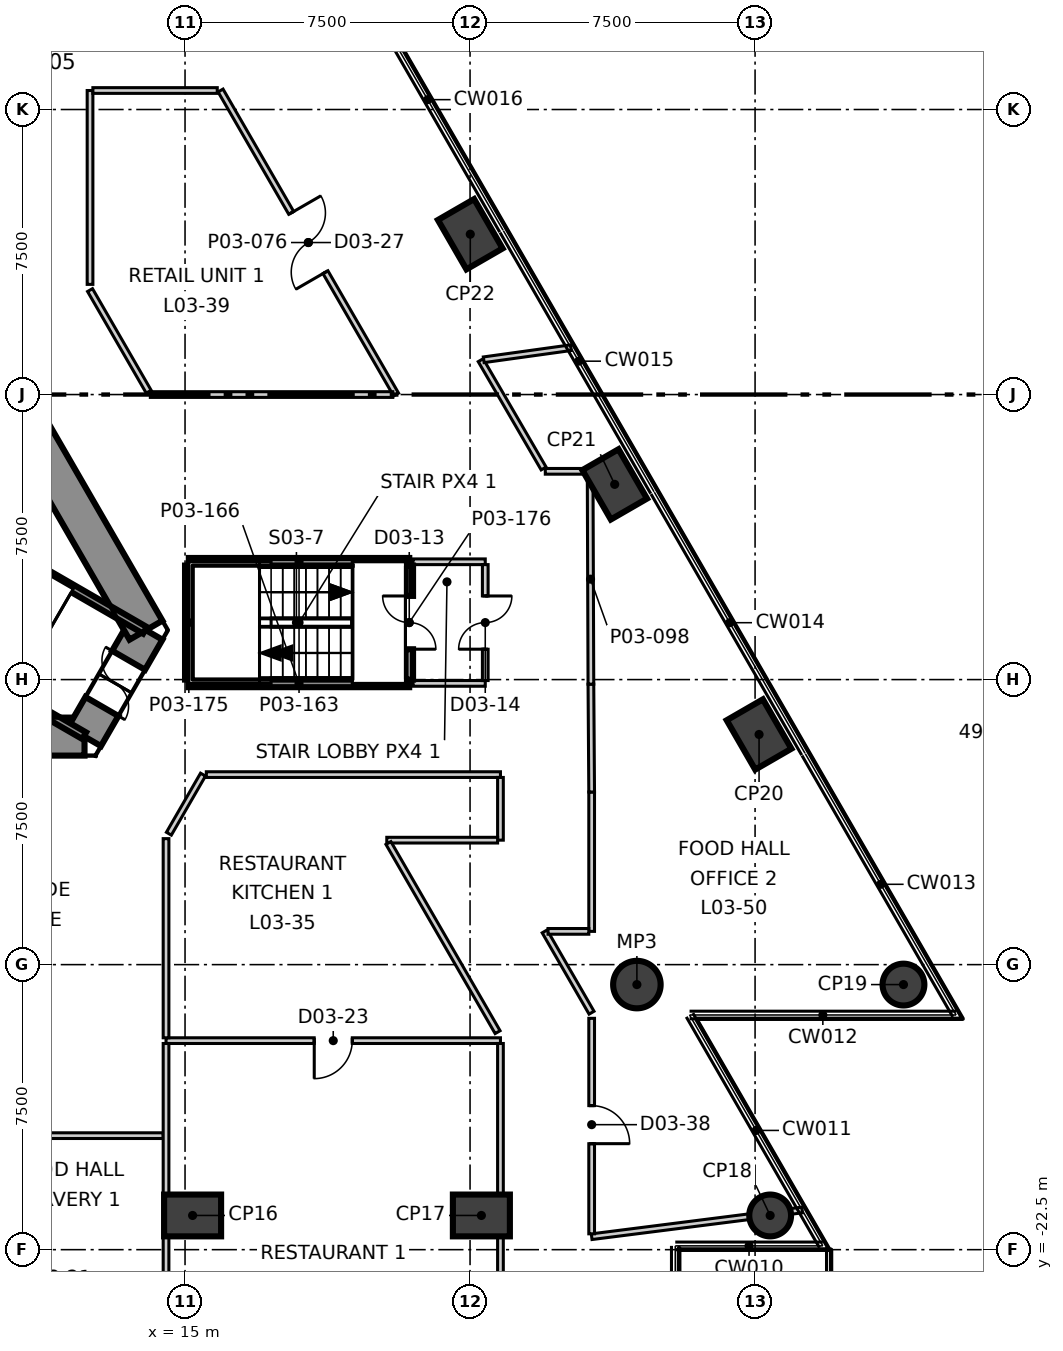
"""IFC4 building model, lengths in metres.
Left out: names, types, materials, properties, quantities, classifications, styles, units other than length and angle.
Written with IfcOpenShell. Run it as: python <this file> out.ifc"""

import sys

from ifc_helpers import new_model, si_unit, direction, frame, frame_2d, origin, origin_2d, place, context, subcontext, project, spatial, polyline, rectangle, circle, outline, extrude, element, fill, save


model = new_model("IFC4")
c1 = context("Model", 3, precision=1e-05, world=origin(), true_north=direction((0.0, 1.0)))
c2 = subcontext(c1, "Body", "Model", "MODEL_VIEW")
j1 = project(units=[si_unit("LENGTHUNIT", "METRE"), si_unit("PLANEANGLEUNIT", "RADIAN")], contexts=[c1])
p1 = place(None, origin())
s1 = spatial("IfcSite", under=j1, at=p1, CompositionType="ELEMENT")
p2 = place(p1, origin())
s2 = spatial("IfcBuilding", under=s1, at=p2, CompositionType="ELEMENT")
p3 = place(p2, frame((0.0, 0.0, 19.9)))
s3 = spatial("IfcBuildingStorey", under=s2, at=p3, CompositionType="ELEMENT", Elevation=19.9)
p4 = place(p3, frame((-12.355, -9.0, -0.4), z_axis=(0.0, 0.0, 1.0), x_axis=(1.0, 0.0, 0.0)))
e1 = element("IfcWall", 1, at=p4, inside=s3, PredefinedType="SHEAR", context=c2, shape_type="SweptSolid", body=[
    extrude(outline(polyline([(-0.289, -0.5), (1.656, -0.5), (3.601, -0.5), (5.547, -0.5), (7.492, -0.5), (9.437, -0.5), (11.382, -0.5), (13.328, -0.5), (15.273, -0.5), (17.218, -0.5), (19.163, -0.5), (21.109, -0.5), (23.054, -0.5), (24.999, -0.5), (24.422, 0.5), (22.566, 0.5), (20.709, 0.5), (18.853, 0.5), (16.996, 0.5), (15.14, 0.5), (13.283, 0.5), (11.427, 0.5), (9.57, 0.5), (7.714, 0.5), (5.857, 0.5), (4.001, 0.5), (2.145, 0.5), (0.288, 0.5), (-0.289, -0.5)])), origin(), (0.0, 0.0, 1.0), 5.4),
])
p5 = place(p3, frame((12.355, -9.0, -0.4), z_axis=(0.0, 0.0, 1.0), x_axis=(0.500077567175, 0.865980615723, 0.0)))
e2 = element("IfcWall", 2, at=p5, inside=s3, PredefinedType="SHEAR", context=c2, shape_type="SweptSolid", body=[
    extrude(outline(polyline([(-0.288, -0.5), (1.617, -0.5), (3.522, -0.5), (2.945, 0.5), (1.617, 0.5), (0.289, 0.499), (-0.288, -0.5)])), origin(), (0.0, 0.0, 1.0), 5.4),
])
p6 = place(p5, frame((0.917, 0.0, 0.4)))
e3 = element("IfcOpeningElement", 3, at=p6, cuts=e2, PredefinedType="OPENING", context=c2, shape_type="SweptSolid", body=[
    extrude(rectangle(XDim=1.4, YDim=2.1, at=frame_2d((0.7, 1.05))), frame((0.0, 0.51, 0.0), z_axis=(0.0, -1.0, 0.0), x_axis=(1.0, 0.0, 0.0)), (0.0, 0.0, 1.0), 1.02),
])
p7 = place(p3, frame((13.972, -6.2, -0.4), z_axis=(0.0, 0.0, 1.0), x_axis=(-0.499992141631, 0.866029940768, 0.0)))
e4 = element("IfcWall", 4, at=p7, inside=s3, PredefinedType="SHEAR", context=c2, shape_type="SweptSolid", body=[
    extrude(outline(polyline([(-0.288, -0.5), (1.657, -0.5), (3.602, -0.5), (5.547, -0.5), (7.493, -0.5), (9.438, -0.5), (11.383, -0.5), (13.328, -0.5), (15.273, -0.5), (17.218, -0.499), (19.164, -0.499), (21.109, -0.499), (23.054, -0.499), (24.999, -0.499), (24.422, 0.5), (22.566, 0.5), (20.709, 0.5), (18.853, 0.5), (16.996, 0.5), (15.14, 0.5), (13.283, 0.5), (11.427, 0.5), (9.57, 0.5), (7.714, 0.5), (5.857, 0.5), (4.001, 0.5), (2.145, 0.5), (0.288, 0.5), (-0.288, -0.5)])), origin(), (0.0, 0.0, 1.0), 5.4),
])
p8 = place(p7, frame((11.455, 0.0, 0.4)))
e5 = element("IfcOpeningElement", 5, at=p8, cuts=e4, PredefinedType="OPENING", context=c2, shape_type="SweptSolid", body=[
    extrude(rectangle(XDim=1.8, YDim=2.1, at=frame_2d((0.9, 1.05))), frame((0.0, 0.51, 0.0), z_axis=(0.0, -1.0, 0.0), x_axis=(1.0, 0.0, 0.0)), (0.0, 0.0, 1.0), 1.02),
])
for number, where, z_axis, x_axis in (
    (6, (15.199, -21.6, -0.4), (0.0, 0.0, 1.0), (1.0, 0.0, 0.0)),
    (7, (22.798, -21.6, -0.4), (0.0, 0.0, 1.0), (1.0, 0.0, 0.0)),
):
    element("IfcColumn", number, at=place(p3, frame(where, z_axis=z_axis, x_axis=x_axis)), inside=s3, PredefinedType="COLUMN", context=c2, shape_type="SweptSolid", body=[
        extrude(rectangle(XDim=1.5, YDim=1.1, at=origin_2d()), origin(), (0.0, 0.0, 1.0), 5.4),
    ])
for number, where, z_axis, x_axis in (
    (8, (30.397, -21.6, -0.4), (0.0, 0.0, 1.0), (1.0, 0.0, 0.0)),
    (9, (33.905, -15.525, -0.4), (0.0, 0.0, 1.0), (-0.5, 0.866, 0.0)),
):
    element("IfcColumn", number, at=place(p3, frame(where, z_axis=z_axis, x_axis=x_axis)), inside=s3, PredefinedType="COLUMN", context=c2, shape_type="SweptSolid", body=[
        extrude(circle(Radius=0.55, at=origin_2d()), origin(), (0.0, 0.0, 1.0), 5.4),
    ])
for number, where, z_axis, x_axis in (
    (10, (30.105, -8.944, -0.4), (0.0, 0.0, 1.0), (-0.5, 0.866, 0.0)),
    (11, (26.306, -2.363, -0.4), (0.0, 0.0, 1.0), (-0.5, 0.866, 0.0)),
    (12, (22.506, 4.219, -0.4), (0.0, 0.0, 1.0), (-0.5, 0.866, 0.0)),
):
    element("IfcColumn", number, at=place(p3, frame(where, z_axis=z_axis, x_axis=x_axis)), inside=s3, PredefinedType="COLUMN", context=c2, shape_type="SweptSolid", body=[
        extrude(rectangle(XDim=1.5, YDim=1.1, at=origin_2d()), origin(), (0.0, 0.0, 1.0), 5.4),
    ])
p9 = place(p3, frame((26.89, -15.525, -0.4), z_axis=(0.0, 0.0, 1.0), x_axis=(1.0, 0.0, 0.0)))
e13 = element("IfcColumn", 13, at=p9, inside=s3, PredefinedType="COLUMN", context=c2, shape_type="SweptSolid", body=[
    extrude(circle(Radius=0.625, at=origin_2d()), origin(), (0.0, 0.0, 1.0), 5.4),
])
for number, where, z_axis, x_axis in (
    (14, (21.0, -7.6, 0.0), (0.0, 0.0, 1.0), (1.0, 0.0, 0.0)),
    (15, (21.0, -4.4, 0.0), (0.0, 0.0, 1.0), (1.0, 0.0, 0.0)),
):
    element("IfcWall", number, at=place(p3, frame(where, z_axis=z_axis, x_axis=x_axis)), inside=s3, PredefinedType="PARTITIONING", context=c2, shape_type="SweptSolid", body=[
        extrude(rectangle(XDim=1.9, YDim=0.15, at=frame_2d((0.95, 0.0))), origin(), (0.0, 0.0, 1.0), 5.0),
    ])
p10 = place(p3, frame((14.5, -17.0, 0.0), z_axis=(0.0, 0.0, 1.0), x_axis=(1.0, 0.0, 0.0)))
e16 = element("IfcWall", 16, at=p10, inside=s3, PredefinedType="PARTITIONING", context=c2, shape_type="SweptSolid", body=[
    extrude(rectangle(XDim=8.8, YDim=0.15, at=frame_2d((4.4, 0.0))), origin(), (0.0, 0.0, 1.0), 5.0),
])
p11 = place(p10, frame((3.9, 0.0, 0.0)))
e17 = element("IfcOpeningElement", 17, at=p11, cuts=e16, PredefinedType="OPENING", context=c2, shape_type="SweptSolid", body=[
    extrude(rectangle(XDim=1.0, YDim=2.1, at=frame_2d((0.5, 1.05))), frame((0.0, 0.085, 0.0), z_axis=(0.0, -1.0, 0.0), x_axis=(1.0, 0.0, 0.0)), (0.0, 0.0, 1.0), 0.17),
])
p12 = place(p3, frame((14.5, -16.925, 0.0), z_axis=(0.0, 0.0, 1.0), x_axis=(0.0, 1.0, 0.0)))
e18 = element("IfcWall", 18, at=p12, inside=s3, PredefinedType="PARTITIONING", context=c2, shape_type="SweptSolid", body=[
    extrude(rectangle(XDim=5.24, YDim=0.15, at=frame_2d((2.62, 0.0))), origin(), (0.0, 0.0, 1.0), 5.0),
])
p13 = place(p3, frame((14.575, -11.555, 0.0), z_axis=(0.0, 0.0, 1.0), x_axis=(0.500087302212, 0.865974993961, 0.0)))
e19 = element("IfcWall", 19, at=p13, inside=s3, PredefinedType="PARTITIONING", context=c2, shape_type="SweptSolid", body=[
    extrude(rectangle(XDim=1.796, YDim=0.15, at=frame_2d((0.898, 0.0))), origin(), (0.0, 0.0, 1.0), 5.0),
])
p14 = place(p3, frame((15.56, -10.0, 0.0), z_axis=(0.0, 0.0, 1.0), x_axis=(1.0, 0.0, 0.0)))
e20 = element("IfcWall", 20, at=p14, inside=s3, PredefinedType="PARTITIONING", context=c2, shape_type="SweptSolid", body=[
    extrude(rectangle(XDim=7.74, YDim=0.15, at=frame_2d((3.87, 0.0))), origin(), (0.0, 0.0, 1.0), 5.0),
])
p15 = place(p3, frame((23.3, -11.725, 0.0), z_axis=(0.0, 0.0, 1.0), x_axis=(0.0, 1.0, 0.0)))
e21 = element("IfcWall", 21, at=p15, inside=s3, PredefinedType="PARTITIONING", context=c2, shape_type="SweptSolid", body=[
    extrude(rectangle(XDim=1.65, YDim=0.15, at=frame_2d((0.825, 0.0))), origin(), (0.0, 0.0, 1.0), 5.0),
])
p16 = place(p3, frame((20.309, -11.725, 0.0), z_axis=(0.0, 0.0, 1.0), x_axis=(1.0, 0.0, 0.0)))
e22 = element("IfcWall", 22, at=p16, inside=s3, PredefinedType="PARTITIONING", context=c2, shape_type="SweptSolid", body=[
    extrude(rectangle(XDim=2.916, YDim=0.15, at=frame_2d((1.458, 0.0))), origin(), (0.0, 0.0, 1.0), 5.0),
])
p17 = place(p3, frame((20.352, -11.8, 0.0), z_axis=(0.0, 0.0, 1.0), x_axis=(0.499940652507, -0.866059665364, 0.0)))
e23 = element("IfcWall", 23, at=p17, inside=s3, PredefinedType="PARTITIONING", context=c2, shape_type="SweptSolid", body=[
    extrude(rectangle(XDim=5.747, YDim=0.15, at=frame_2d((2.874, 0.0))), origin(), (0.0, 0.0, 1.0), 5.0),
])
p18 = place(p3, frame((22.9, -7.525, 0.0), z_axis=(0.0, 0.0, 1.0), x_axis=(0.0, 1.0, 0.0)))
e24 = element("IfcWall", 24, at=p18, inside=s3, PredefinedType="PARTITIONING", context=c2, shape_type="SweptSolid", body=[
    extrude(rectangle(XDim=3.05, YDim=0.15, at=frame_2d((1.525, 0.0))), origin(), (0.0, 0.0, 1.0), 5.0),
])
p19 = place(p18, frame((0.825, 0.0, 0.0)))
e25 = element("IfcOpeningElement", 25, at=p19, cuts=e24, PredefinedType="OPENING", context=c2, shape_type="SweptSolid", body=[
    extrude(rectangle(XDim=1.4, YDim=2.1, at=frame_2d((0.7, 1.05))), frame((0.0, 0.085, 0.0), z_axis=(0.0, -1.0, 0.0), x_axis=(1.0, 0.0, 0.0)), (0.0, 0.0, 1.0), 0.17),
])
p20 = place(p3, frame((24.48, -2.02, 0.0), z_axis=(0.0, 0.0, 1.0), x_axis=(1.0, 0.0, 0.0)))
e26 = element("IfcWall", 26, at=p20, inside=s3, PredefinedType="PARTITIONING", context=c2, shape_type="SweptSolid", body=[
    extrude(rectangle(XDim=1.18, YDim=0.15, at=frame_2d((0.59, 0.0))), origin(), (0.0, 0.0, 1.0), 4.4),
])
p21 = place(p3, frame((9.4, -19.5, 0.0), z_axis=(0.0, 0.0, 1.0), x_axis=(1.0, 0.0, 0.0)))
e27 = element("IfcWall", 27, at=p21, inside=s3, PredefinedType="PARTITIONING", context=c2, shape_type="SweptSolid", body=[
    extrude(rectangle(XDim=5.025, YDim=0.15, at=frame_2d((2.513, 0.0))), origin(), (0.0, 0.0, 1.0), 5.0),
])
p22 = place(p3, frame((24.463, -14.126, 0.0), z_axis=(0.0, 0.0, 1.0), x_axis=(0.49976524706, -0.866160896041, 0.0)))
e28 = element("IfcWall", 28, at=p22, inside=s3, PredefinedType="PARTITIONING", context=c2, shape_type="SweptSolid", body=[
    extrude(rectangle(XDim=2.469, YDim=0.15, at=frame_2d((1.235, 0.0))), origin(), (0.0, 0.0, 1.0), 5.0),
])
p23 = place(p3, frame((15.935, 8.0, 0.0), z_axis=(0.0, 0.0, 1.0), x_axis=(0.500007658653, -0.866020982014, 0.0)))
e29 = element("IfcWall", 29, at=p23, inside=s3, PredefinedType="PARTITIONING", context=c2, shape_type="SweptSolid", body=[
    extrude(rectangle(XDim=9.238, YDim=0.15, at=frame_2d((4.619, 0.0))), origin(), (0.0, 0.0, 1.0), 5.0),
])
p24 = place(p23, frame((3.719, 0.0, 0.0)))
e30 = element("IfcOpeningElement", 30, at=p24, cuts=e29, PredefinedType="OPENING", context=c2, shape_type="SweptSolid", body=[
    extrude(rectangle(XDim=1.8, YDim=2.1, at=frame_2d((0.9, 1.05))), frame((0.0, 0.085, 0.0), z_axis=(0.0, -1.0, 0.0), x_axis=(1.0, 0.0, 0.0)), (0.0, 0.0, 1.0), 0.17),
])
for number, where, z_axis, x_axis in (
    (31, (23.3, -28.925, 0.0), (0.0, 0.0, 1.0), (0.0, 1.0, 0.0)),
    (32, (14.5, -28.925, 0.0), (0.0, 0.0, 1.0), (0.0, 1.0, 0.0)),
):
    element("IfcWall", number, at=place(p3, frame(where, z_axis=z_axis, x_axis=x_axis)), inside=s3, PredefinedType="PARTITIONING", context=c2, shape_type="SweptSolid", body=[
        extrude(rectangle(XDim=11.85, YDim=0.15, at=frame_2d((5.925, 0.0))), origin(), (0.0, 0.0, 1.0), 5.0),
    ])
p25 = place(p3, frame((25.7, -22.159, 0.0), z_axis=(0.0, 0.0, 1.0), x_axis=(0.992041968398, 0.125907636529, 0.0)))
e33 = element("IfcWall", 33, at=p25, inside=s3, PredefinedType="PARTITIONING", context=c2, shape_type="SweptSolid", body=[
    extrude(rectangle(XDim=5.583, YDim=0.15, at=frame_2d((2.791, 0.0))), origin(), (0.0, 0.0, 1.0), 4.1),
])
p26 = place(p3, frame((25.7, -22.083, 0.0), z_axis=(0.0, 0.0, 1.0), x_axis=(0.0, 1.0, 0.0)))
e34 = element("IfcWall", 34, at=p26, inside=s3, PredefinedType="PARTITIONING", context=c2, shape_type="SweptSolid", body=[
    extrude(rectangle(XDim=5.67, YDim=0.15, at=frame_2d((2.835, 0.0))), origin(), (0.0, 0.0, 1.0), 5.0),
])
p27 = place(p26, frame((2.372, 0.0, 0.0)))
e35 = element("IfcOpeningElement", 35, at=p27, cuts=e34, PredefinedType="OPENING", context=c2, shape_type="SweptSolid", body=[
    extrude(rectangle(XDim=1.0, YDim=2.1, at=frame_2d((0.5, 1.05))), frame((0.0, 0.085, 0.0), z_axis=(0.0, -1.0, 0.0), x_axis=(1.0, 0.0, 0.0)), (0.0, 0.0, 1.0), 0.17),
])
p28 = place(p3, frame((25.7, -14.125, 0.0), z_axis=(0.0, 0.0, 1.0), x_axis=(0.0, 1.0, 0.0)))
e36 = element("IfcWall", 36, at=p28, inside=s3, PredefinedType="PARTITIONING", context=c2, shape_type="SweptSolid", body=[
    extrude(rectangle(XDim=3.667, YDim=0.15, at=frame_2d((1.833, 0.0))), origin(), (0.0, 0.0, 1.0), 5.0),
])
p29 = place(p3, frame((24.552, -14.125, 0.0), z_axis=(0.0, 0.0, 1.0), x_axis=(1.0, 0.0, 0.0)))
e37 = element("IfcWall", 37, at=p29, inside=s3, PredefinedType="PARTITIONING", context=c2, shape_type="SweptSolid", body=[
    extrude(rectangle(XDim=1.073, YDim=0.15, at=frame_2d((0.537, 0.0))), origin(), (0.0, 0.0, 1.0), 5.0),
])
p30 = place(p3, frame((25.68, -7.62, 0.0), z_axis=(0.0, 0.0, 1.0), x_axis=(0.007054194748, -0.999975118859, 0.0)))
e38 = element("IfcWall", 38, at=p30, inside=s3, PredefinedType="PARTITIONING", context=c2, shape_type="SweptSolid", body=[
    extrude(rectangle(XDim=2.838, YDim=0.15, at=frame_2d((1.419, 0.0))), origin(), (0.0, 0.0, 1.0), 5.0),
])
p31 = place(p3, frame((25.66, -2.095, 0.0), z_axis=(0.0, 0.0, 1.0), x_axis=(0.00362332472, -0.999993435737, 0.0)))
e39 = element("IfcWall", 39, at=p31, inside=s3, PredefinedType="PARTITIONING", context=c2, shape_type="SweptSolid", body=[
    extrude(rectangle(XDim=5.525, YDim=0.15, at=frame_2d((2.763, 0.0))), origin(), (0.0, 0.0, 1.0), 5.0),
])
p32 = place(p3, frame((22.78, 0.904, 0.0), z_axis=(0.0, 0.0, 1.0), x_axis=(0.502516154273, -0.864567819604, 0.0)))
e40 = element("IfcWall", 40, at=p32, inside=s3, PredefinedType="PARTITIONING", context=c2, shape_type="SweptSolid", body=[
    extrude(rectangle(XDim=3.295, YDim=0.15, at=frame_2d((1.648, 0.0))), origin(), (0.0, 0.0, 1.0), 5.0),
])
p33 = place(p3, frame((22.86, 0.915, 0.0), z_axis=(0.0, 0.0, 1.0), x_axis=(0.990527369276, 0.137315442376, 0.0)))
e41 = element("IfcWall", 41, at=p33, inside=s3, PredefinedType="PARTITIONING", context=c2, shape_type="SweptSolid", body=[
    extrude(rectangle(XDim=2.315, YDim=0.15, at=frame_2d((1.157, 0.0))), origin(), (0.0, 0.0, 1.0), 5.0),
])
p34 = place(p3, frame((14.087, 0.0, 0.0), z_axis=(0.0, 0.0, 1.0), x_axis=(1.0, 0.0, 0.0)))
e42 = element("IfcWall", 42, at=p34, inside=s3, PredefinedType="PARTITIONING", context=c2, shape_type="SweptSolid", body=[
    extrude(rectangle(XDim=6.38, YDim=0.15, at=frame_2d((3.19, 0.0))), origin(), (0.0, 0.0, 1.0), 5.0),
])
p35 = place(p3, frame((12.5, 2.749, 0.0), z_axis=(0.0, 0.0, 1.0), x_axis=(0.500016752221, -0.866015731669, 0.0)))
e43 = element("IfcWall", 43, at=p35, inside=s3, PredefinedType="PARTITIONING", context=c2, shape_type="SweptSolid", body=[
    extrude(rectangle(XDim=3.088, YDim=0.15, at=frame_2d((1.544, 0.0))), origin(), (0.0, 0.0, 1.0), 5.0),
])
p36 = place(p3, frame((12.5, 2.899, 0.0), z_axis=(0.0, 0.0, 1.0), x_axis=(0.0, 1.0, 0.0)))
e44 = element("IfcWall", 44, at=p36, inside=s3, PredefinedType="PARTITIONING", context=c2, shape_type="SweptSolid", body=[
    extrude(rectangle(XDim=5.101, YDim=0.15, at=frame_2d((2.551, 0.0))), origin(), (0.0, 0.0, 1.0), 5.0),
])
p37 = place(p3, frame((12.575, 8.0, 0.0), z_axis=(0.0, 0.0, 1.0), x_axis=(1.0, 0.0, 0.0)))
e45 = element("IfcWall", 45, at=p37, inside=s3, PredefinedType="PARTITIONING", context=c2, shape_type="SweptSolid", body=[
    extrude(rectangle(XDim=3.273, YDim=0.15, at=frame_2d((1.636, 0.0))), origin(), (0.0, 0.0, 1.0), 5.0),
])
p38 = place(p3, frame((4.929, -4.693, 0.0), z_axis=(0.0, 0.0, 1.0), x_axis=(0.865987152174, -0.50006624788, 0.0)))
e46 = element("IfcWall", 46, at=p38, inside=s3, PredefinedType="SOLIDWALL", context=c2, shape_type="SweptSolid", body=[
    extrude(rectangle(XDim=8.565, YDim=0.2, at=frame_2d((4.282, 0.0))), origin(), (0.0, 0.0, 1.0), 5.0),
])
p39 = place(p3, frame((6.529, -1.922, 0.0), z_axis=(0.0, 0.0, 1.0), x_axis=(0.866036527536, -0.499980732602, 0.0)))
e47 = element("IfcWall", 47, at=p39, inside=s3, PredefinedType="SOLIDWALL", context=c2, shape_type="SweptSolid", body=[
    extrude(rectangle(XDim=8.564, YDim=0.2, at=frame_2d((4.282, 0.0))), origin(), (0.0, 0.0, 1.0), 5.0),
])
p40 = place(p3, frame((15.1, -4.4, 0.0), z_axis=(0.0, 0.0, 1.0), x_axis=(1.0, 0.0, 0.0)))
e48 = element("IfcWall", 48, at=p40, inside=s3, PredefinedType="SOLIDWALL", context=c2, shape_type="SweptSolid", body=[
    extrude(rectangle(XDim=5.8, YDim=0.2, at=frame_2d((2.9, 0.0))), origin(), (0.0, 0.0, 1.0), 5.0),
])
p41 = place(p3, frame((15.1, -7.6, 0.0), z_axis=(0.0, 0.0, 1.0), x_axis=(1.0, 0.0, 0.0)))
e49 = element("IfcWall", 49, at=p41, inside=s3, PredefinedType="SOLIDWALL", context=c2, shape_type="SweptSolid", body=[
    extrude(rectangle(XDim=5.798, YDim=0.2, at=frame_2d((2.899, 0.0))), origin(), (0.0, 0.0, 1.0), 5.0),
])
p42 = place(p3, frame((15.1, -7.5, 0.0), z_axis=(0.0, 0.0, 1.0), x_axis=(0.0, 1.0, 0.0)))
e50 = element("IfcWall", 50, at=p42, inside=s3, PredefinedType="SOLIDWALL", context=c2, shape_type="SweptSolid", body=[
    extrude(rectangle(XDim=3.0, YDim=0.2, at=frame_2d((1.5, 0.0))), origin(), (0.0, 0.0, 1.0), 5.0),
])
p43 = place(p3, frame((20.9, -7.5, 0.0), z_axis=(0.0, 0.0, 1.0), x_axis=(0.0, 1.0, 0.0)))
e51 = element("IfcWall", 51, at=p43, inside=s3, PredefinedType="SOLIDWALL", context=c2, shape_type="SweptSolid", body=[
    extrude(rectangle(XDim=3.0, YDim=0.2, at=frame_2d((1.5, 0.0))), origin(), (0.0, 0.0, 1.0), 5.0),
])
p44 = place(p43, frame((0.8, 0.0, 0.0)))
e52 = element("IfcOpeningElement", 52, at=p44, cuts=e51, PredefinedType="OPENING", context=c2, shape_type="SweptSolid", body=[
    extrude(rectangle(XDim=1.4, YDim=2.1, at=frame_2d((0.7, 1.05))), frame((0.0, 0.11, 0.0), z_axis=(0.0, -1.0, 0.0), x_axis=(1.0, 0.0, 0.0)), (0.0, 0.0, 1.0), 0.22),
])
p45 = place(p44, origin())
e53 = element("IfcDoor", 53, at=p45, inside=s3, OperationType="DOUBLE_DOOR_SINGLE_SWING", PredefinedType="DOOR", context=c2, shape_type="SweptSolid", body=[
    extrude(rectangle(XDim=1.4, YDim=2.1, at=frame_2d((0.7, 1.05))), frame((0.0, 0.025, 0.0), z_axis=(0.0, -1.0, 0.0), x_axis=(1.0, 0.0, 0.0)), (0.0, 0.0, 1.0), 0.05),
])
fill(e52, e53)
p46 = place(p19, origin())
e54 = element("IfcDoor", 54, at=p46, inside=s3, OperationType="DOUBLE_DOOR_SINGLE_SWING", PredefinedType="DOOR", context=c2, shape_type="SweptSolid", body=[
    extrude(rectangle(XDim=1.4, YDim=2.1, at=frame_2d((0.7, 1.05))), frame((0.0, 0.025, 0.0), z_axis=(0.0, -1.0, 0.0), x_axis=(1.0, 0.0, 0.0)), (0.0, 0.0, 1.0), 0.05),
])
fill(e25, e54)
p47 = place(p11, origin())
e55 = element("IfcDoor", 55, at=p47, inside=s3, OperationType="SINGLE_SWING_LEFT", PredefinedType="DOOR", context=c2, shape_type="SweptSolid", body=[
    extrude(rectangle(XDim=1.0, YDim=2.1, at=frame_2d((0.5, 1.05))), frame((0.0, 0.025, 0.0), z_axis=(0.0, -1.0, 0.0), x_axis=(1.0, 0.0, 0.0)), (0.0, 0.0, 1.0), 0.05),
])
fill(e17, e55)
p48 = place(p24, origin())
e56 = element("IfcDoor", 56, at=p48, inside=s3, OperationType="DOUBLE_DOOR_SINGLE_SWING", PredefinedType="DOOR", context=c2, shape_type="SweptSolid", body=[
    extrude(rectangle(XDim=1.8, YDim=2.1, at=frame_2d((0.9, 1.05))), frame((0.0, 0.025, 0.0), z_axis=(0.0, -1.0, 0.0), x_axis=(1.0, 0.0, 0.0)), (0.0, 0.0, 1.0), 0.05),
])
fill(e30, e56)
p49 = place(p27, origin())
e57 = element("IfcDoor", 57, at=p49, inside=s3, OperationType="SINGLE_SWING_LEFT", PredefinedType="DOOR", context=c2, shape_type="SweptSolid", body=[
    extrude(rectangle(XDim=1.0, YDim=2.1, at=frame_2d((0.5, 1.05))), frame((0.0, 0.025, 0.0), z_axis=(0.0, -1.0, 0.0), x_axis=(1.0, 0.0, 0.0)), (0.0, 0.0, 1.0), 0.05),
])
fill(e35, e57)
p50 = place(p6, origin())
e58 = element("IfcDoor", 58, at=p50, inside=s3, OperationType="DOUBLE_DOOR_SINGLE_SWING", PredefinedType="DOOR", context=c2, shape_type="SweptSolid", body=[
    extrude(rectangle(XDim=1.4, YDim=2.1, at=frame_2d((0.7, 1.05))), frame((0.0, 0.025, 0.0), z_axis=(0.0, -1.0, 0.0), x_axis=(1.0, 0.0, 0.0)), (0.0, 0.0, 1.0), 0.05),
])
fill(e3, e58)
save(model, sys.argv[1])
